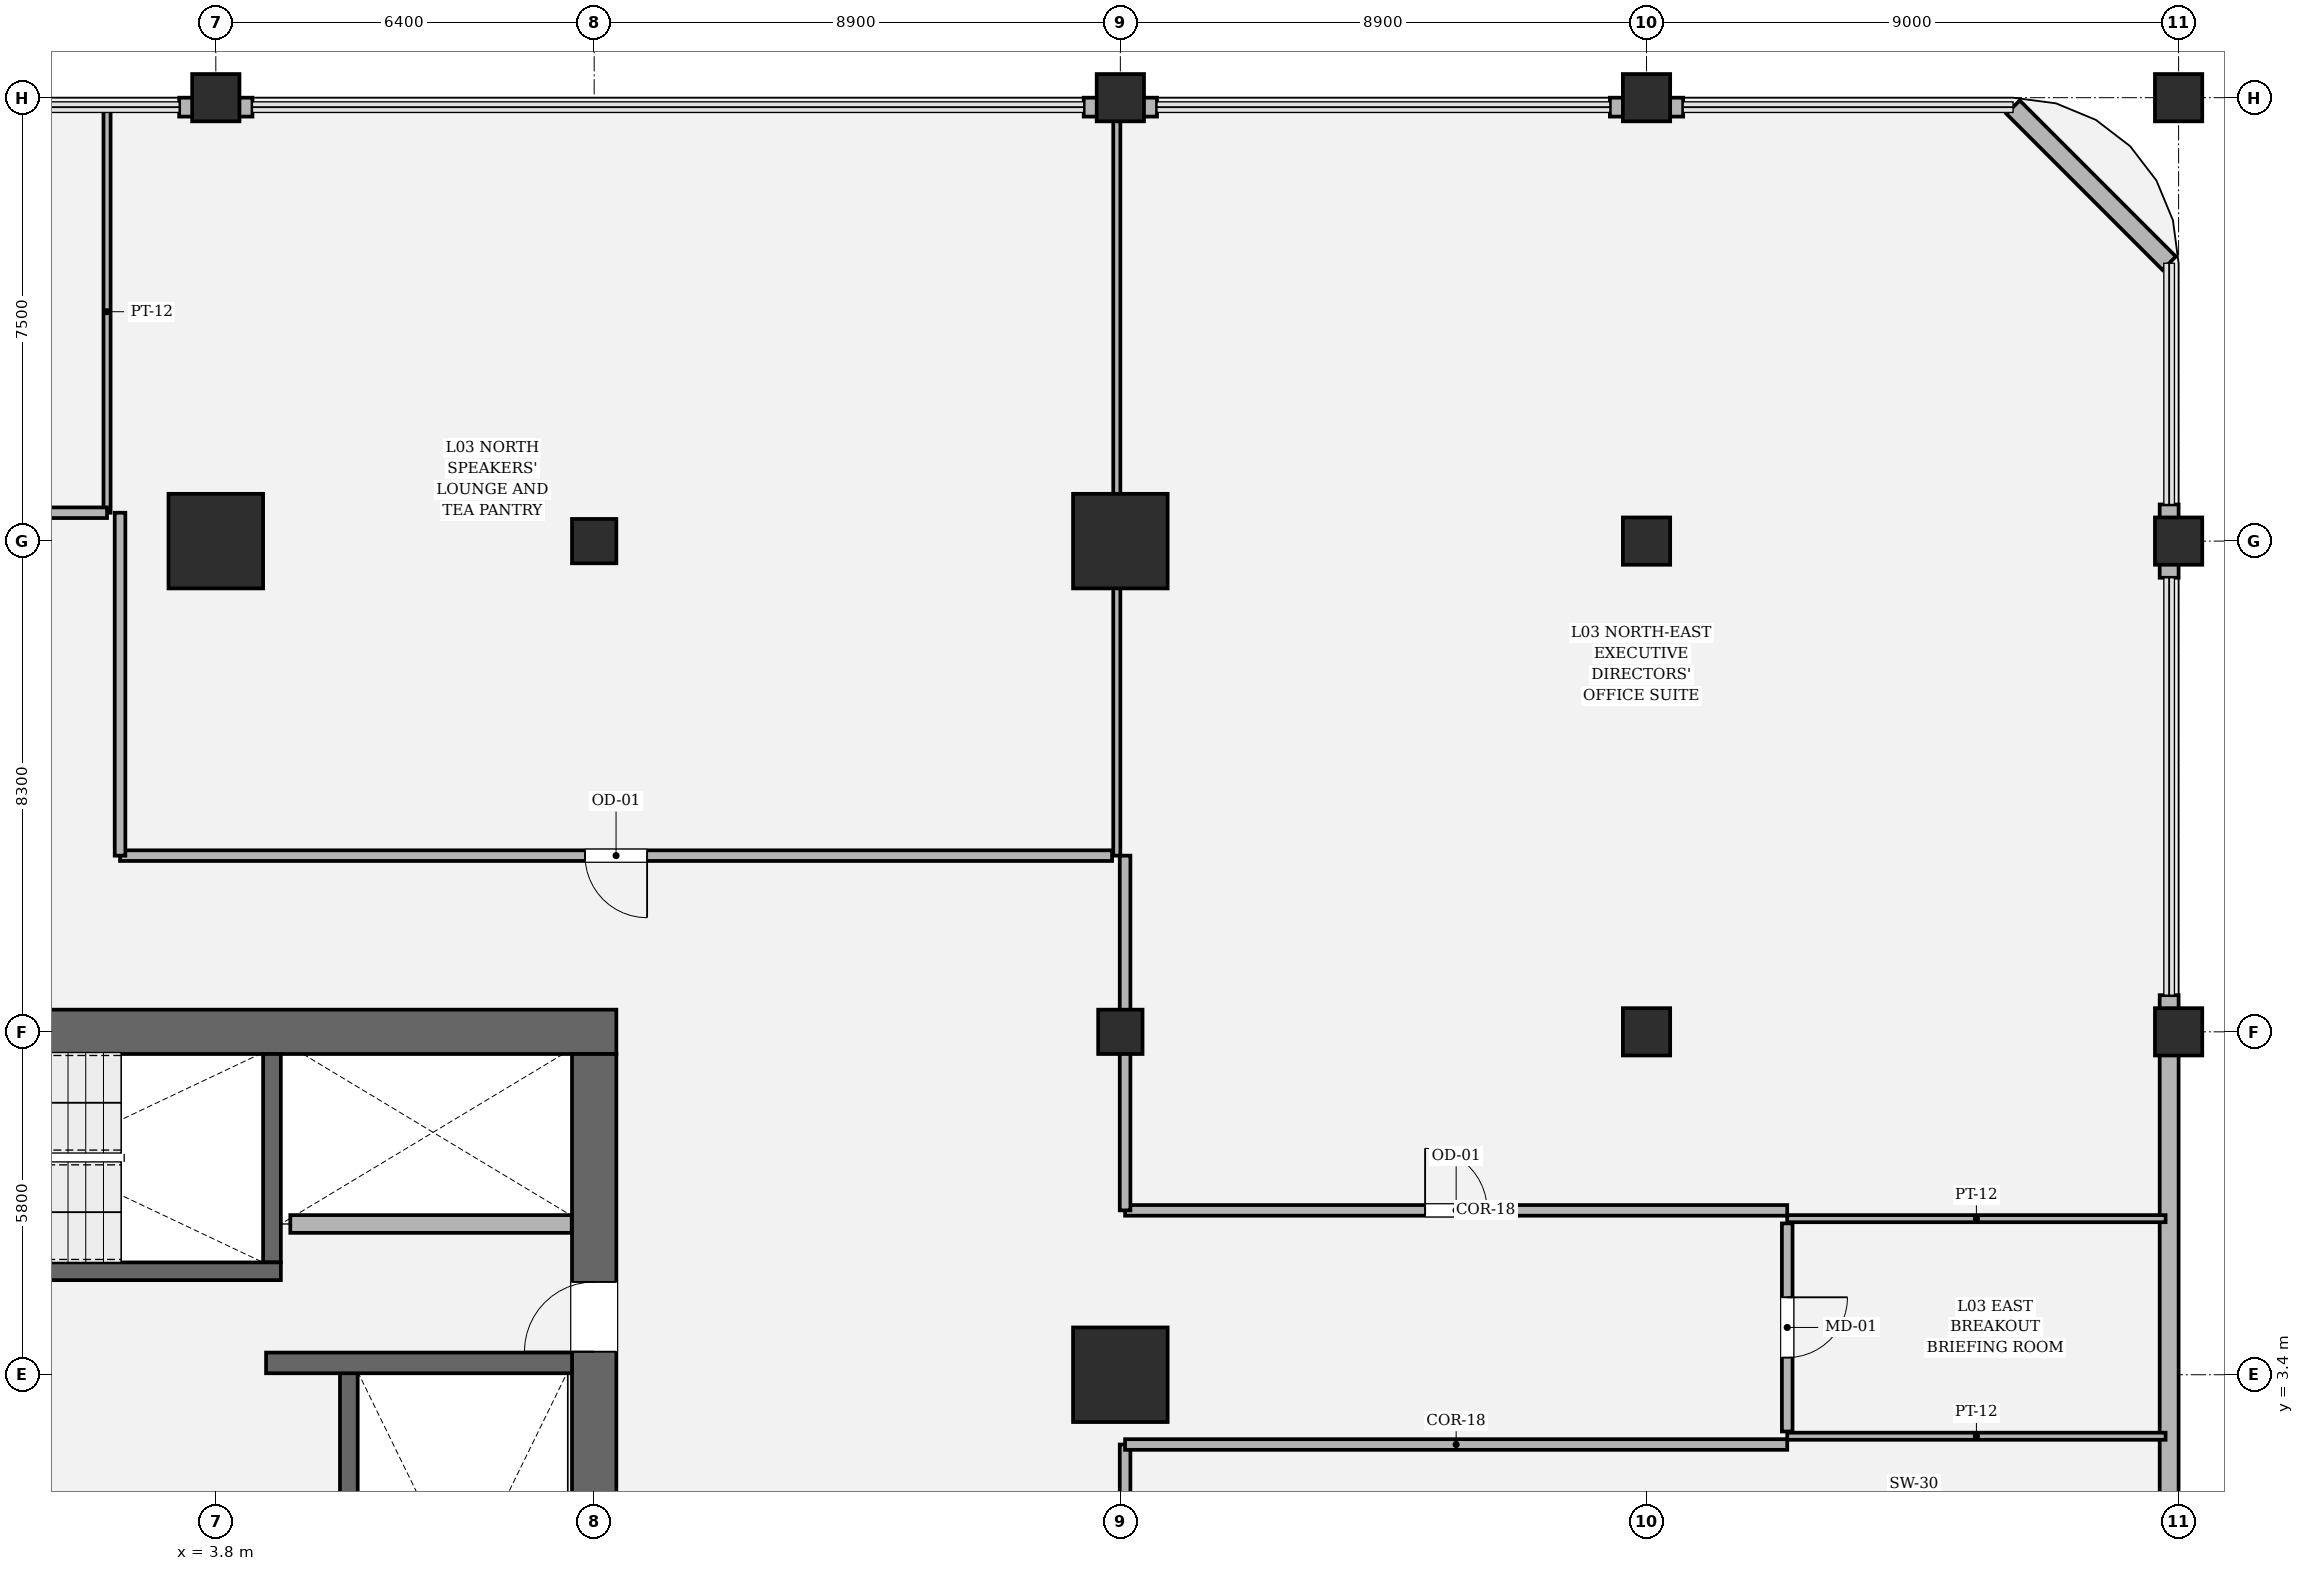
"""IFC4 building model, lengths in metres.
Left out: names, types, materials, properties, quantities, classifications, styles, units other than length and angle.
Written with IfcOpenShell. Run it as: python <this file> out.ifc"""

import sys

from ifc_helpers import new_model, si_unit, direction, frame, frame_2d, origin, origin_2d, place, context, subcontext, project, spatial, rectangle, hollow_rectangle, circle, extrude, element, fill, save


model = new_model("IFC4")
c1 = context("Model", 3, precision=1e-05, world=origin(), true_north=direction((0.0, 1.0)))
c2 = subcontext(c1, "Body", "Model", "MODEL_VIEW")
j1 = project(units=[si_unit("LENGTHUNIT", "METRE"), si_unit("PLANEANGLEUNIT", "RADIAN")], contexts=[c1])
p1 = place(None, origin())
s1 = spatial("IfcSite", under=j1, at=p1, CompositionType="ELEMENT")
p2 = place(p1, origin())
s2 = spatial("IfcBuilding", under=s1, at=p2, CompositionType="ELEMENT")
p3 = place(p2, frame((0.0, 0.0, 16.8)))
s3 = spatial("IfcBuildingStorey", under=s2, at=p3, CompositionType="ELEMENT", Elevation=16.8)
p4 = place(p3, frame((-10.575, 9.2, 0.0), z_axis=(0.0, 0.0, 1.0), x_axis=(1.0, 0.0, 0.0)))
e1 = element("IfcWall", 1, at=p4, inside=s3, PredefinedType="SHEAR", context=c2, shape_type="SweptSolid", body=[
    extrude(rectangle(XDim=21.15, YDim=0.75, at=frame_2d((10.575, 0.0))), origin(), (0.0, 0.0, 1.0), 5.4),
])
p5 = place(p3, frame((10.2, 8.825, 0.0), z_axis=(0.0, 0.0, 1.0), x_axis=(0.0, -1.0, 0.0)))
e2 = element("IfcWall", 2, at=p5, inside=s3, PredefinedType="SHEAR", context=c2, shape_type="SweptSolid", body=[
    extrude(rectangle(XDim=17.65, YDim=0.75, at=frame_2d((8.825, 0.0))), origin(), (0.0, 0.0, 1.0), 5.4),
])
p6 = place(p5, frame((3.855, 0.0, 0.0)))
e3 = element("IfcOpeningElement", 3, at=p6, cuts=e2, PredefinedType="OPENING", context=c2, shape_type="SweptSolid", body=[
    extrude(rectangle(XDim=1.18, YDim=2.2, at=frame_2d((0.59, 1.1))), frame((0.0, 0.385, 0.0), z_axis=(0.0, -1.0, 0.0), x_axis=(1.0, 0.0, 0.0)), (0.0, 0.0, 1.0), 0.77),
])
p7 = place(p3, frame((6.05, 3.45, 0.0), z_axis=(0.0, 0.0, 1.0), x_axis=(0.0, -1.0, 0.0)))
e4 = element("IfcWall", 4, at=p7, inside=s3, PredefinedType="SOLIDWALL", context=c2, shape_type="SweptSolid", body=[
    extrude(rectangle(XDim=8.95, YDim=0.3, at=frame_2d((4.475, 0.0))), origin(), (0.0, 0.0, 1.0), 5.4),
])
p8 = place(p3, frame((4.75, 8.825, 0.0), z_axis=(0.0, 0.0, 1.0), x_axis=(0.0, -1.0, 0.0)))
e5 = element("IfcWall", 5, at=p8, inside=s3, PredefinedType="SOLIDWALL", context=c2, shape_type="SweptSolid", body=[
    extrude(rectangle(XDim=3.525, YDim=0.3, at=frame_2d((1.762, 0.0))), origin(), (0.0, 0.0, 1.0), 5.4),
])
p9 = place(p3, frame((-4.9, 5.15, 0.0), z_axis=(0.0, 0.0, 1.0), x_axis=(1.0, 0.0, 0.0)))
e6 = element("IfcWall", 6, at=p9, inside=s3, PredefinedType="SOLIDWALL", context=c2, shape_type="SweptSolid", body=[
    extrude(rectangle(XDim=9.8, YDim=0.3, at=frame_2d((4.9, 0.0))), origin(), (0.0, 0.0, 1.0), 5.4),
])
p10 = place(p9, frame((0.56, 0.0, 0.0)))
e7 = element("IfcOpeningElement", 7, at=p10, cuts=e6, PredefinedType="OPENING", context=c2, shape_type="SweptSolid", body=[
    extrude(rectangle(XDim=1.18, YDim=2.2, at=frame_2d((0.59, 1.1))), frame((0.0, 0.16, 0.0), z_axis=(0.0, -1.0, 0.0), x_axis=(1.0, 0.0, 0.0)), (0.0, 0.0, 1.0), 0.32),
])
p11 = place(p3, frame((4.65, 3.6, 0.0), z_axis=(0.0, 0.0, 1.0), x_axis=(1.0, 0.0, 0.0)))
e8 = element("IfcWall", 8, at=p11, inside=s3, PredefinedType="SOLIDWALL", context=c2, shape_type="SweptSolid", body=[
    extrude(rectangle(XDim=5.175, YDim=0.35, at=frame_2d((2.587, 0.0))), origin(), (0.0, 0.0, 1.0), 5.4),
])
for number, where, z_axis, x_axis in (
    (9, (19.1, 3.4, 0.0), (0.0, 0.0, 1.0), (1.0, 0.0, 0.0)),
    (10, (19.1, 17.5, 0.0), (0.0, 0.0, 1.0), (1.0, 0.0, 0.0)),
    (11, (3.8, 17.5, 0.0), (0.0, 0.0, 1.0), (1.0, 0.0, 0.0)),
):
    element("IfcColumn", number, at=place(p3, frame(where, z_axis=z_axis, x_axis=x_axis)), inside=s3, PredefinedType="COLUMN", context=c2, shape_type="SweptSolid", body=[
        extrude(hollow_rectangle(XDim=1.6, YDim=1.6, WallThickness=0.05, at=origin_2d()), origin(), (0.0, 0.0, 1.0), 5.4),
    ])
for number, where, z_axis, x_axis in (
    (12, (37.0, 9.2, 0.0), (0.0, 0.0, 1.0), (1.0, 0.0, 0.0)),
    (13, (28.0, 17.5, 0.0), (0.0, 0.0, 1.0), (1.0, 0.0, 0.0)),
    (14, (37.0, 17.5, 0.0), (0.0, 0.0, 1.0), (1.0, 0.0, 0.0)),
    (15, (3.8, 25.0, 0.0), (0.0, 0.0, 1.0), (1.0, 0.0, 0.0)),
    (16, (19.1, 25.0, 0.0), (0.0, 0.0, 1.0), (1.0, 0.0, 0.0)),
    (17, (28.0, 25.0, 0.0), (0.0, 0.0, 1.0), (1.0, 0.0, 0.0)),
    (18, (37.0, 25.0, 0.0), (0.0, 0.0, 1.0), (1.0, 0.0, 0.0)),
    (19, (28.0, 9.2, 0.0), (0.0, 0.0, 1.0), (1.0, 0.0, 0.0)),
):
    element("IfcColumn", number, at=place(p3, frame(where, z_axis=z_axis, x_axis=x_axis)), inside=s3, PredefinedType="COLUMN", context=c2, shape_type="SweptSolid", body=[
        extrude(rectangle(XDim=0.8, YDim=0.8, at=origin_2d()), origin(), (0.0, 0.0, 1.0), 5.4),
    ])
for number, where, z_axis, x_axis in (
    (20, (10.2, 17.5, 0.0), (0.0, 0.0, 1.0), (1.0, 0.0, 0.0)),
    (21, (19.1, 9.2, 0.0), (0.0, 0.0, 1.0), (1.0, 0.0, 0.0)),
):
    element("IfcColumn", number, at=place(p3, frame(where, z_axis=z_axis, x_axis=x_axis)), inside=s3, PredefinedType="PILASTER", context=c2, shape_type="SweptSolid", body=[
        extrude(circle(Radius=0.375, at=origin_2d()), origin(), (0.0, 0.0, 1.0), 5.4),
    ])
for number, where, z_axis, x_axis in (
    (22, (4.42, 24.84, 0.0), (0.0, 0.0, 1.0), (-1.0, 0.0, 0.0)),
    (23, (19.72, 24.84, 0.0), (0.0, 0.0, 1.0), (-1.0, 0.0, 0.0)),
):
    element("IfcWall", number, at=place(p3, frame(where, z_axis=z_axis, x_axis=x_axis)), inside=s3, PredefinedType="SOLIDWALL", context=c2, shape_type="SweptSolid", body=[
        extrude(rectangle(XDim=1.24, YDim=0.32, at=frame_2d((0.62, 0.0))), origin(), (0.0, 0.0, 1.0), 4.314),
    ])
p12 = place(p3, frame((28.62, 24.84, 0.0), z_axis=(0.0, 0.0, 1.0), x_axis=(-1.0, 0.0, 0.0)))
e24 = element("IfcWall", 24, at=p12, inside=s3, PredefinedType="SOLIDWALL", context=c2, shape_type="SweptSolid", body=[
    extrude(rectangle(XDim=1.24, YDim=0.32, at=frame_2d((0.62, 0.0))), origin(), (0.0, 0.0, 1.0), 4.314),
])
p13 = place(p3, frame((36.84, 9.82, 0.0), z_axis=(0.0, 0.0, 1.0), x_axis=(0.0, -1.0, 0.0)))
e25 = element("IfcWall", 25, at=p13, inside=s3, PredefinedType="SOLIDWALL", context=c2, shape_type="SweptSolid", body=[
    extrude(rectangle(XDim=19.64, YDim=0.32, at=frame_2d((9.82, 0.0))), origin(), (0.0, 0.0, 1.0), 4.314),
])
p14 = place(p3, frame((36.84, 18.12, 0.0), z_axis=(0.0, 0.0, 1.0), x_axis=(0.0, -1.0, 0.0)))
e26 = element("IfcWall", 26, at=p14, inside=s3, PredefinedType="SOLIDWALL", context=c2, shape_type="SweptSolid", body=[
    extrude(rectangle(XDim=1.24, YDim=0.32, at=frame_2d((0.62, 0.0))), origin(), (0.0, 0.0, 1.0), 4.314),
])
p15 = place(p3, frame((34.2, 24.84, 0.0), z_axis=(0.0, 0.0, 1.0), x_axis=(0.707106781187, -0.707106781187, 0.0)))
e27 = element("IfcWall", 27, at=p15, inside=s3, PredefinedType="SOLIDWALL", context=c2, shape_type="SweptSolid", body=[
    extrude(rectangle(XDim=3.734, YDim=0.32, at=frame_2d((1.867, 0.0))), origin(), (0.0, 0.0, 1.0), 4.464),
])
p16 = place(p3, frame((5.06, 5.95, 0.0), z_axis=(0.0, 0.0, 1.0), x_axis=(1.0, 0.0, 0.0)))
e28 = element("IfcWall", 28, at=p16, inside=s3, PredefinedType="SOLIDWALL", context=c2, shape_type="SweptSolid", body=[
    extrude(rectangle(XDim=4.76, YDim=0.3, at=frame_2d((2.38, 0.0))), origin(), (0.0, 0.0, 1.0), 5.02),
])
p17 = place(p3, frame((1.96, 24.78, 0.0), z_axis=(0.0, 0.0, 1.0), x_axis=(0.0, -1.0, 0.0)))
e29 = element("IfcWall", 29, at=p17, inside=s3, PredefinedType="PARTITIONING", context=c2, shape_type="SweptSolid", body=[
    extrude(rectangle(XDim=6.8, YDim=0.12, at=frame_2d((3.4, 0.0))), origin(), (0.0, 0.0, 1.0), 5.02),
])
p18 = place(p3, frame((1.96, 17.98, 0.0), z_axis=(0.0, 0.0, 1.0), x_axis=(-1.0, 0.0, 0.0)))
e30 = element("IfcWall", 30, at=p18, inside=s3, PredefinedType="PARTITIONING", context=c2, shape_type="SweptSolid", body=[
    extrude(rectangle(XDim=8.1, YDim=0.18, at=frame_2d((4.05, 0.0))), origin(), (0.0, 0.0, 1.0), 4.314),
])
p19 = place(p18, frame((3.35, 0.0, 0.0)))
e31 = element("IfcOpeningElement", 31, at=p19, cuts=e30, PredefinedType="OPENING", context=c2, shape_type="SweptSolid", body=[
    extrude(rectangle(XDim=1.4, YDim=2.25, at=frame_2d((0.7, 1.125))), frame((0.0, 0.1, 0.0), z_axis=(0.0, -1.0, 0.0), x_axis=(1.0, 0.0, 0.0)), (0.0, 0.0, 1.0), 0.2),
])
p20 = place(p3, frame((19.18, -12.18, 0.0), z_axis=(0.0, 0.0, 1.0), x_axis=(0.0, 1.0, 0.0)))
e32 = element("IfcWall", 32, at=p20, inside=s3, PredefinedType="PARTITIONING", context=c2, shape_type="SweptSolid", body=[
    extrude(rectangle(XDim=14.4, YDim=0.18, at=frame_2d((7.2, 0.0))), origin(), (0.0, 0.0, 1.0), 4.314),
])
p21 = place(p20, frame((6.05, 0.0, 0.0)))
e33 = element("IfcOpeningElement", 33, at=p21, cuts=e32, PredefinedType="OPENING", context=c2, shape_type="SweptSolid", body=[
    extrude(rectangle(XDim=1.4, YDim=2.25, at=frame_2d((0.7, 1.125))), frame((0.0, 0.1, 0.0), z_axis=(0.0, -1.0, 0.0), x_axis=(1.0, 0.0, 0.0)), (0.0, 0.0, 1.0), 0.2),
])
p22 = place(p3, frame((19.18, 2.22, 0.0), z_axis=(0.0, 0.0, 1.0), x_axis=(1.0, 0.0, 0.0)))
e34 = element("IfcWall", 34, at=p22, inside=s3, PredefinedType="PARTITIONING", context=c2, shape_type="SweptSolid", body=[
    extrude(rectangle(XDim=11.2, YDim=0.18, at=frame_2d((5.6, 0.0))), origin(), (0.0, 0.0, 1.0), 4.314),
])
for number, where, z_axis, x_axis in (
    (35, (30.38, 2.36, 0.0), (0.0, 0.0, 1.0), (1.0, 0.0, 0.0)),
    (36, (36.78, 6.04, 0.0), (0.0, 0.0, 1.0), (-1.0, 0.0, 0.0)),
):
    element("IfcWall", number, at=place(p3, frame(where, z_axis=z_axis, x_axis=x_axis)), inside=s3, PredefinedType="PARTITIONING", context=c2, shape_type="SweptSolid", body=[
        extrude(rectangle(XDim=6.4, YDim=0.12, at=frame_2d((3.2, 0.0))), origin(), (0.0, 0.0, 1.0), 5.02),
    ])
p23 = place(p3, frame((30.38, 6.18, 0.0), z_axis=(0.0, 0.0, 1.0), x_axis=(-1.0, 0.0, 0.0)))
e37 = element("IfcWall", 37, at=p23, inside=s3, PredefinedType="PARTITIONING", context=c2, shape_type="SweptSolid", body=[
    extrude(rectangle(XDim=11.2, YDim=0.18, at=frame_2d((5.6, 0.0))), origin(), (0.0, 0.0, 1.0), 4.314),
])
p24 = place(p23, frame((5.075, 0.0, 0.0)))
e38 = element("IfcOpeningElement", 38, at=p24, cuts=e37, PredefinedType="OPENING", context=c2, shape_type="SweptSolid", body=[
    extrude(rectangle(XDim=1.05, YDim=2.2, at=frame_2d((0.525, 1.1))), frame((0.0, 0.1, 0.0), z_axis=(0.0, -1.0, 0.0), x_axis=(1.0, 0.0, 0.0)), (0.0, 0.0, 1.0), 0.2),
])
p25 = place(p3, frame((19.18, 6.18, 0.0), z_axis=(0.0, 0.0, 1.0), x_axis=(0.0, 1.0, 0.0)))
e39 = element("IfcWall", 39, at=p25, inside=s3, PredefinedType="PARTITIONING", context=c2, shape_type="SweptSolid", body=[
    extrude(rectangle(XDim=6.0, YDim=0.18, at=frame_2d((3.0, 0.0))), origin(), (0.0, 0.0, 1.0), 4.314),
])
p26 = place(p3, frame((19.04, 12.18, 0.0), z_axis=(0.0, 0.0, 1.0), x_axis=(0.0, 1.0, 0.0)))
e40 = element("IfcWall", 40, at=p26, inside=s3, PredefinedType="PARTITIONING", context=c2, shape_type="SweptSolid", body=[
    extrude(rectangle(XDim=12.6, YDim=0.12, at=frame_2d((6.3, 0.0))), origin(), (0.0, 0.0, 1.0), 4.314),
])
p27 = place(p3, frame((18.96, 12.18, 0.0), z_axis=(0.0, 0.0, 1.0), x_axis=(-1.0, 0.0, 0.0)))
e41 = element("IfcWall", 41, at=p27, inside=s3, PredefinedType="PARTITIONING", context=c2, shape_type="SweptSolid", body=[
    extrude(rectangle(XDim=16.78, YDim=0.18, at=frame_2d((8.39, 0.0))), origin(), (0.0, 0.0, 1.0), 4.314),
])
p28 = place(p27, frame((7.865, 0.0, 0.0)))
e42 = element("IfcOpeningElement", 42, at=p28, cuts=e41, PredefinedType="OPENING", context=c2, shape_type="SweptSolid", body=[
    extrude(rectangle(XDim=1.05, YDim=2.2, at=frame_2d((0.525, 1.1))), frame((0.0, 0.1, 0.0), z_axis=(0.0, -1.0, 0.0), x_axis=(1.0, 0.0, 0.0)), (0.0, 0.0, 1.0), 0.2),
])
p29 = place(p3, frame((2.18, 12.18, 0.0), z_axis=(0.0, 0.0, 1.0), x_axis=(0.0, 1.0, 0.0)))
e43 = element("IfcWall", 43, at=p29, inside=s3, PredefinedType="PARTITIONING", context=c2, shape_type="SweptSolid", body=[
    extrude(rectangle(XDim=5.8, YDim=0.18, at=frame_2d((2.9, 0.0))), origin(), (0.0, 0.0, 1.0), 4.314),
])
p30 = place(p3, frame((30.38, 2.44, 0.0), z_axis=(0.0, 0.0, 1.0), x_axis=(0.0, 1.0, 0.0)))
e44 = element("IfcWall", 44, at=p30, inside=s3, PredefinedType="PARTITIONING", context=c2, shape_type="SweptSolid", body=[
    extrude(rectangle(XDim=3.52, YDim=0.18, at=frame_2d((1.76, 0.0))), origin(), (0.0, 0.0, 1.0), 4.564),
])
p31 = place(p30, frame((1.25, 0.0, 0.0)))
e45 = element("IfcOpeningElement", 45, at=p31, cuts=e44, PredefinedType="OPENING", context=c2, shape_type="SweptSolid", body=[
    extrude(rectangle(XDim=1.02, YDim=2.2, at=frame_2d((0.51, 1.1))), frame((0.0, 0.1, 0.0), z_axis=(0.0, -1.0, 0.0), x_axis=(1.0, 0.0, 0.0)), (0.0, 0.0, 1.0), 0.2),
])
p32 = place(p6, origin())
e46 = element("IfcDoor", 46, at=p32, inside=s3, OperationType="SINGLE_SWING_RIGHT", PredefinedType="DOOR", context=c2, shape_type="SweptSolid", body=[
    extrude(rectangle(XDim=1.18, YDim=2.2, at=frame_2d((0.59, 1.1))), frame((0.0, 0.025, 0.0), z_axis=(0.0, -1.0, 0.0), x_axis=(1.0, 0.0, 0.0)), (0.0, 0.0, 1.0), 0.05),
])
fill(e3, e46)
p33 = place(p24, origin())
e47 = element("IfcDoor", 47, at=p33, inside=s3, OperationType="SINGLE_SWING_RIGHT", PredefinedType="DOOR", context=c2, shape_type="SweptSolid", body=[
    extrude(rectangle(XDim=1.05, YDim=2.2, at=frame_2d((0.525, 1.1))), frame((0.0, 0.025, 0.0), z_axis=(0.0, -1.0, 0.0), x_axis=(1.0, 0.0, 0.0)), (0.0, 0.0, 1.0), 0.05),
])
fill(e38, e47)
p34 = place(p28, origin())
e48 = element("IfcDoor", 48, at=p34, inside=s3, OperationType="SINGLE_SWING_LEFT", PredefinedType="DOOR", context=c2, shape_type="SweptSolid", body=[
    extrude(rectangle(XDim=1.05, YDim=2.2, at=frame_2d((0.525, 1.1))), frame((0.0, 0.025, 0.0), z_axis=(0.0, -1.0, 0.0), x_axis=(1.0, 0.0, 0.0)), (0.0, 0.0, 1.0), 0.05),
])
fill(e42, e48)
p35 = place(p31, origin())
e49 = element("IfcDoor", 49, at=p35, inside=s3, OperationType="SINGLE_SWING_RIGHT", PredefinedType="DOOR", context=c2, shape_type="SweptSolid", body=[
    extrude(rectangle(XDim=1.02, YDim=2.2, at=frame_2d((0.51, 1.1))), frame((0.0, 0.025, 0.0), z_axis=(0.0, -1.0, 0.0), x_axis=(1.0, 0.0, 0.0)), (0.0, 0.0, 1.0), 0.05),
])
fill(e45, e49)
save(model, sys.argv[1])
